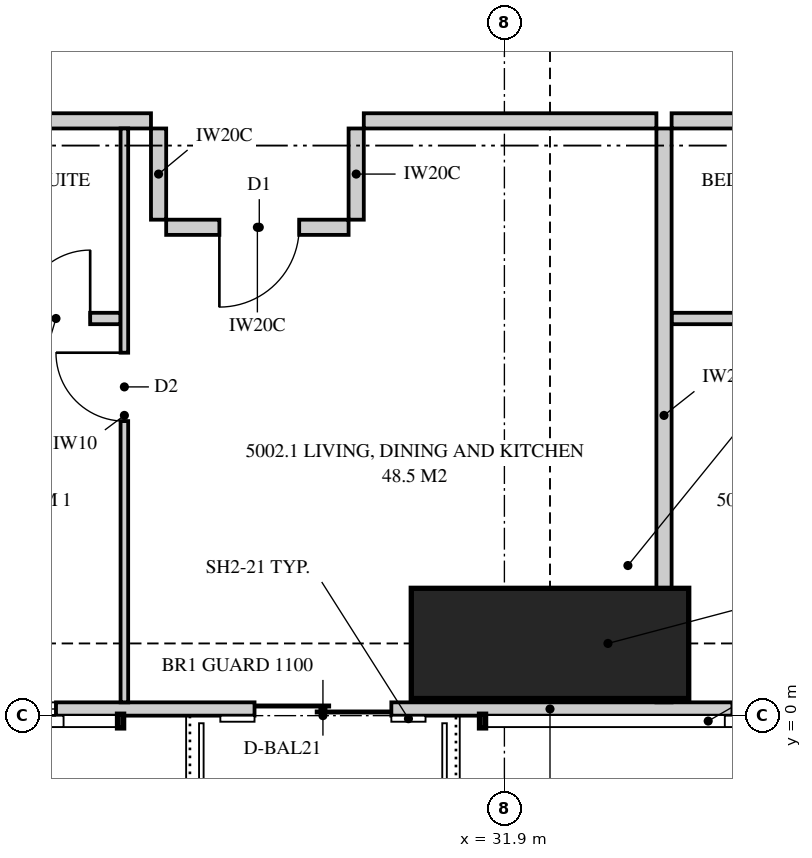
"""IFC4 building model, lengths in metres.
Left out: names, types, materials, properties, quantities, classifications, styles, units other than length and angle.
Written with IfcOpenShell. Run it as: python <this file> out.ifc"""

import sys

from ifc_helpers import new_model, si_unit, direction, frame, frame_2d, origin, origin_2d, place, context, subcontext, project, spatial, polyline, rectangle, outline, extrude, element, fill, save


model = new_model("IFC4")
c1 = context("Model", 3, precision=1e-05, world=origin(), true_north=direction((0.0, 1.0)))
c2 = subcontext(c1, "Body", "Model", "MODEL_VIEW")
j1 = project(units=[si_unit("LENGTHUNIT", "METRE"), si_unit("PLANEANGLEUNIT", "RADIAN")], contexts=[c1])
p1 = place(None, origin())
s1 = spatial("IfcSite", under=j1, at=p1, CompositionType="ELEMENT")
p2 = place(p1, origin())
s2 = spatial("IfcBuilding", under=s1, at=p2, CompositionType="ELEMENT")
p3 = place(p2, frame((0.0, 0.0, 184.5)))
s3 = spatial("IfcBuildingStorey", under=s2, at=p3, CompositionType="ELEMENT", Elevation=184.5)
p4 = place(p3, frame((32.5, 0.95, 0.0), z_axis=(0.0, 0.0, 1.0), x_axis=(0.0, 1.0, 0.0)))
e1 = element("IfcColumn", 1, at=p4, inside=s3, PredefinedType="COLUMN", context=c2, shape_type="SweptSolid", body=[
    extrude(rectangle(XDim=1.45, YDim=3.65, at=origin_2d()), origin(), (0.0, 0.0, 1.0), 3.35),
])
p5 = place(p3, frame((15.051, 0.087, 0.0), z_axis=(0.0, 0.0, 1.0), x_axis=(1.0, 0.0, 0.0)))
e2 = element("IfcWall", 2, at=p5, inside=s3, PredefinedType="SOLIDWALL", context=c2, shape_type="SweptSolid", body=[
    extrude(outline(polyline([(0.0, 0.0), (34.897, 0.0), (34.897, 3.11), (27.91, 3.11), (27.91, 2.15), (27.836, 2.15), (27.836, 3.11), (27.699, 3.11), (27.699, 2.15), (7.199, 2.15), (7.199, 3.11), (7.062, 3.11), (7.062, 2.15), (6.987, 2.15), (6.987, 3.11), (0.0, 3.11), (0.0, 0.0)])), frame((0.0, 0.087, 0.0), z_axis=(0.0, -1.0, 0.0), x_axis=(1.0, 0.0, 0.0)), (0.0, 0.0, 1.0), 0.175),
])
p6 = place(p5, frame((2.84, 0.0, 0.4)))
e3 = element("IfcOpeningElement", 3, at=p6, cuts=e2, PredefinedType="OPENING", context=c2, shape_type="SweptSolid", body=[
    extrude(rectangle(XDim=2.4, YDim=1.7, at=frame_2d((1.2, 0.85))), frame((0.0, 0.097, 0.0), z_axis=(0.0, -1.0, 0.0), x_axis=(1.0, 0.0, 0.0)), (0.0, 0.0, 1.0), 0.195),
])
p7 = place(p5, frame((9.149, 0.0, 0.4)))
e4 = element("IfcOpeningElement", 4, at=p7, cuts=e2, PredefinedType="OPENING", context=c2, shape_type="SweptSolid", body=[
    extrude(rectangle(XDim=1.8, YDim=1.7, at=frame_2d((0.9, 0.85))), frame((0.0, 0.097, 0.0), z_axis=(0.0, -1.0, 0.0), x_axis=(1.0, 0.0, 0.0)), (0.0, 0.0, 1.0), 0.195),
])
p8 = place(p5, frame((13.561, 0.0, 0.0)))
e5 = element("IfcOpeningElement", 5, at=p8, cuts=e2, PredefinedType="OPENING", context=c2, shape_type="SweptSolid", body=[
    extrude(rectangle(XDim=1.8, YDim=2.1, at=frame_2d((0.9, 1.05))), frame((0.0, 0.097, 0.0), z_axis=(0.0, -1.0, 0.0), x_axis=(1.0, 0.0, 0.0)), (0.0, 0.0, 1.0), 0.195),
])
p9 = place(p5, frame((19.849, 0.0, 0.4)))
e6 = element("IfcOpeningElement", 6, at=p9, cuts=e2, PredefinedType="OPENING", context=c2, shape_type="SweptSolid", body=[
    extrude(rectangle(XDim=1.8, YDim=1.7, at=frame_2d((0.9, 0.85))), frame((0.0, 0.097, 0.0), z_axis=(0.0, -1.0, 0.0), x_axis=(1.0, 0.0, 0.0)), (0.0, 0.0, 1.0), 0.195),
])
p10 = place(p5, frame((23.449, 0.0, 0.4)))
e7 = element("IfcOpeningElement", 7, at=p10, cuts=e2, PredefinedType="OPENING", context=c2, shape_type="SweptSolid", body=[
    extrude(rectangle(XDim=1.8, YDim=1.7, at=frame_2d((0.9, 0.85))), frame((0.0, 0.097, 0.0), z_axis=(0.0, -1.0, 0.0), x_axis=(1.0, 0.0, 0.0)), (0.0, 0.0, 1.0), 0.195),
])
p11 = place(p5, frame((29.636, 0.0, 0.4)))
e8 = element("IfcOpeningElement", 8, at=p11, cuts=e2, PredefinedType="OPENING", context=c2, shape_type="SweptSolid", body=[
    extrude(rectangle(XDim=1.8, YDim=1.7, at=frame_2d((0.9, 0.85))), frame((0.0, 0.097, 0.0), z_axis=(0.0, -1.0, 0.0), x_axis=(1.0, 0.0, 0.0)), (0.0, 0.0, 1.0), 0.195),
])
p12 = place(p5, frame((32.56, 0.0, 0.4)))
e9 = element("IfcOpeningElement", 9, at=p12, cuts=e2, PredefinedType="OPENING", context=c2, shape_type="SweptSolid", body=[
    extrude(rectangle(XDim=1.8, YDim=1.7, at=frame_2d((0.9, 0.85))), frame((0.0, 0.097, 0.0), z_axis=(0.0, -1.0, 0.0), x_axis=(1.0, 0.0, 0.0)), (0.0, 0.0, 1.0), 0.195),
])
p13 = place(p3, frame((34.0, 0.175, 0.0), z_axis=(0.0, 0.0, 1.0), x_axis=(0.0, 1.0, 0.0)))
e10 = element("IfcWall", 10, at=p13, inside=s3, PredefinedType="PARTITIONING", context=c2, shape_type="SweptSolid", body=[
    extrude(outline(polyline([(0.0, 0.0), (7.55, 0.0), (7.55, 3.11), (1.685, 3.11), (1.685, 2.15), (0.0, 2.15), (0.0, 3.11), (0.0, 0.0)])), frame((0.0, 0.1, 0.0), z_axis=(0.0, -1.0, 0.0), x_axis=(1.0, 0.0, 0.0)), (0.0, 0.0, 1.0), 0.2),
])
p14 = place(p3, frame((23.4, 7.825, 0.0), z_axis=(0.0, 0.0, 1.0), x_axis=(1.0, 0.0, 0.0)))
e11 = element("IfcWall", 11, at=p14, inside=s3, PredefinedType="PARTITIONING", context=c2, shape_type="SweptSolid", body=[
    extrude(rectangle(XDim=3.85, YDim=0.2, at=frame_2d((1.925, 0.0))), origin(), (0.0, 0.0, 1.0), 3.11),
])
p15 = place(p3, frame((26.9, 0.175, 0.0), z_axis=(0.0, 0.0, 1.0), x_axis=(0.0, 1.0, 0.0)))
e12 = element("IfcWall", 12, at=p15, inside=s3, PredefinedType="PARTITIONING", context=c2, shape_type="SweptSolid", body=[
    extrude(outline(polyline([(0.0, 0.0), (7.55, 0.0), (7.55, 3.11), (1.635, 3.11), (1.635, 2.15), (0.0, 2.15), (0.0, 3.11), (0.0, 0.0)])), frame((0.0, 0.05, 0.0), z_axis=(0.0, -1.0, 0.0), x_axis=(1.0, 0.0, 0.0)), (0.0, 0.0, 1.0), 0.1),
])
p16 = place(p15, frame((3.7, 0.0, 0.0)))
e13 = element("IfcOpeningElement", 13, at=p16, cuts=e12, PredefinedType="OPENING", context=c2, shape_type="SweptSolid", body=[
    extrude(rectangle(XDim=0.9, YDim=2.1, at=frame_2d((0.45, 1.05))), frame((0.0, 0.06, 0.0), z_axis=(0.0, -1.0, 0.0), x_axis=(1.0, 0.0, 0.0)), (0.0, 0.0, 1.0), 0.12),
])
p17 = place(p3, frame((23.4, 5.225, 0.0), z_axis=(0.0, 0.0, 1.0), x_axis=(1.0, 0.0, 0.0)))
e14 = element("IfcWall", 14, at=p17, inside=s3, PredefinedType="PLUMBINGWALL", context=c2, shape_type="SweptSolid", body=[
    extrude(rectangle(XDim=3.45, YDim=0.15, at=frame_2d((1.725, 0.0))), origin(), (0.0, 0.0, 1.0), 3.11),
])
p18 = place(p17, frame((2.15, 0.0, 0.0)))
e15 = element("IfcOpeningElement", 15, at=p18, cuts=e14, PredefinedType="OPENING", context=c2, shape_type="SweptSolid", body=[
    extrude(rectangle(XDim=0.9, YDim=2.1, at=frame_2d((0.45, 1.05))), frame((0.0, 0.085, 0.0), z_axis=(0.0, -1.0, 0.0), x_axis=(1.0, 0.0, 0.0)), (0.0, 0.0, 1.0), 0.17),
])
p19 = place(p3, frame((34.1, 7.825, 0.0), z_axis=(0.0, 0.0, 1.0), x_axis=(1.0, 0.0, 0.0)))
e16 = element("IfcWall", 16, at=p19, inside=s3, PredefinedType="PARTITIONING", context=c2, shape_type="SweptSolid", body=[
    extrude(outline(polyline([(0.0, 0.0), (11.85, 0.0), (11.85, 3.11), (8.987, 3.11), (8.987, 2.541), (8.312, 2.541), (8.312, 3.11), (0.0, 3.11), (0.0, 0.0)])), frame((0.0, 0.1, 0.0), z_axis=(0.0, -1.0, 0.0), x_axis=(1.0, 0.0, 0.0)), (0.0, 0.0, 1.0), 0.2),
])
p20 = place(p19, frame((8.9, 0.0, 0.0)))
e17 = element("IfcOpeningElement", 17, at=p20, cuts=e16, PredefinedType="OPENING", context=c2, shape_type="SweptSolid", body=[
    extrude(rectangle(XDim=1.05, YDim=2.2, at=frame_2d((0.525, 1.1))), frame((0.0, 0.11, 0.0), z_axis=(0.0, -1.0, 0.0), x_axis=(1.0, 0.0, 0.0)), (0.0, 0.0, 1.0), 0.22),
])
p21 = place(p3, frame((34.1, 5.225, 0.0), z_axis=(0.0, 0.0, 1.0), x_axis=(1.0, 0.0, 0.0)))
e18 = element("IfcWall", 18, at=p21, inside=s3, PredefinedType="PLUMBINGWALL", context=c2, shape_type="SweptSolid", body=[
    extrude(rectangle(XDim=3.45, YDim=0.15, at=frame_2d((1.725, 0.0))), origin(), (0.0, 0.0, 1.0), 3.11),
])
p22 = place(p21, frame((2.15, 0.0, 0.0)))
e19 = element("IfcOpeningElement", 19, at=p22, cuts=e18, PredefinedType="OPENING", context=c2, shape_type="SweptSolid", body=[
    extrude(rectangle(XDim=0.9, YDim=2.1, at=frame_2d((0.45, 1.05))), frame((0.0, 0.085, 0.0), z_axis=(0.0, -1.0, 0.0), x_axis=(1.0, 0.0, 0.0)), (0.0, 0.0, 1.0), 0.17),
])
p23 = place(p3, frame((30.05, 7.825, 0.0), z_axis=(0.0, 0.0, 1.0), x_axis=(1.0, 0.0, 0.0)))
e20 = element("IfcWall", 20, at=p23, inside=s3, PredefinedType="PARTITIONING", context=c2, shape_type="SweptSolid", body=[
    extrude(outline(polyline([(0.0, 0.0), (3.85, 0.0), (3.85, 3.11), (2.787, 3.11), (2.787, 2.541), (2.113, 2.541), (2.113, 3.11), (0.0, 3.11), (0.0, 0.0)])), frame((0.0, 0.1, 0.0), z_axis=(0.0, -1.0, 0.0), x_axis=(1.0, 0.0, 0.0)), (0.0, 0.0, 1.0), 0.2),
])
p24 = place(p3, frame((27.45, 6.425, 0.0), z_axis=(0.0, 0.0, 1.0), x_axis=(1.0, 0.0, 0.0)))
e21 = element("IfcWall", 21, at=p24, inside=s3, PredefinedType="PARTITIONING", context=c2, shape_type="SweptSolid", body=[
    extrude(rectangle(XDim=2.4, YDim=0.2, at=frame_2d((1.2, 0.0))), origin(), (0.0, 0.0, 1.0), 3.11),
])
p25 = place(p24, frame((0.7, 0.0, 0.0)))
e22 = element("IfcOpeningElement", 22, at=p25, cuts=e21, PredefinedType="OPENING", context=c2, shape_type="SweptSolid", body=[
    extrude(rectangle(XDim=1.05, YDim=2.2, at=frame_2d((0.525, 1.1))), frame((0.0, 0.11, 0.0), z_axis=(0.0, -1.0, 0.0), x_axis=(1.0, 0.0, 0.0)), (0.0, 0.0, 1.0), 0.22),
])
for number, where, z_axis, x_axis in (
    (23, (27.35, 7.725, 0.0), (0.0, 0.0, 1.0), (0.0, -1.0, 0.0)),
    (24, (29.95, 7.725, 0.0), (0.0, 0.0, 1.0), (0.0, -1.0, 0.0)),
):
    element("IfcWall", number, at=place(p3, frame(where, z_axis=z_axis, x_axis=x_axis)), inside=s3, PredefinedType="PARTITIONING", context=c2, shape_type="SweptSolid", body=[
        extrude(rectangle(XDim=1.2, YDim=0.2, at=frame_2d((0.6, 0.0))), origin(), (0.0, 0.0, 1.0), 3.11),
    ])
p26 = place(p7, origin())
e25 = element("IfcWindow", 25, at=p26, inside=s3, PartitioningType="SINGLE_PANEL", PredefinedType="WINDOW", context=c2, shape_type="SweptSolid", body=[
    extrude(rectangle(XDim=1.8, YDim=1.7, at=frame_2d((0.9, 0.85))), frame((0.0, 0.03, 0.0), z_axis=(0.0, -1.0, 0.0), x_axis=(1.0, 0.0, 0.0)), (0.0, 0.0, 1.0), 0.06),
])
fill(e4, e25)
p27 = place(p8, origin())
e26 = element("IfcDoor", 26, at=p27, inside=s3, OperationType="SLIDING_TO_LEFT", PredefinedType="DOOR", context=c2, shape_type="SweptSolid", body=[
    extrude(rectangle(XDim=1.8, YDim=2.1, at=frame_2d((0.9, 1.05))), frame((0.0, 0.025, 0.0), z_axis=(0.0, -1.0, 0.0), x_axis=(1.0, 0.0, 0.0)), (0.0, 0.0, 1.0), 0.05),
])
fill(e5, e26)
p28 = place(p9, origin())
e27 = element("IfcWindow", 27, at=p28, inside=s3, PartitioningType="SINGLE_PANEL", PredefinedType="WINDOW", context=c2, shape_type="SweptSolid", body=[
    extrude(rectangle(XDim=1.8, YDim=1.7, at=frame_2d((0.9, 0.85))), frame((0.0, 0.03, 0.0), z_axis=(0.0, -1.0, 0.0), x_axis=(1.0, 0.0, 0.0)), (0.0, 0.0, 1.0), 0.06),
])
fill(e6, e27)
p29 = place(p25, frame((1.05, 0.0, 0.0), z_axis=(0.0, 0.0, 1.0), x_axis=(-1.0, 0.0, 0.0)))
e28 = element("IfcDoor", 28, at=p29, inside=s3, OperationType="SINGLE_SWING_RIGHT", PredefinedType="DOOR", context=c2, shape_type="SweptSolid", body=[
    extrude(rectangle(XDim=1.05, YDim=2.2, at=frame_2d((0.525, 1.1))), frame((0.0, 0.025, 0.0), z_axis=(0.0, -1.0, 0.0), x_axis=(1.0, 0.0, 0.0)), (0.0, 0.0, 1.0), 0.05),
])
fill(e22, e28)
p30 = place(p16, origin())
e29 = element("IfcDoor", 29, at=p30, inside=s3, OperationType="SINGLE_SWING_RIGHT", PredefinedType="DOOR", context=c2, shape_type="SweptSolid", body=[
    extrude(rectangle(XDim=0.9, YDim=2.1, at=frame_2d((0.45, 1.05))), frame((0.0, 0.025, 0.0), z_axis=(0.0, -1.0, 0.0), x_axis=(1.0, 0.0, 0.0)), (0.0, 0.0, 1.0), 0.05),
])
fill(e13, e29)
p31 = place(p18, origin())
e30 = element("IfcDoor", 30, at=p31, inside=s3, OperationType="SINGLE_SWING_RIGHT", PredefinedType="DOOR", context=c2, shape_type="SweptSolid", body=[
    extrude(rectangle(XDim=0.9, YDim=2.1, at=frame_2d((0.45, 1.05))), frame((0.0, 0.025, 0.0), z_axis=(0.0, -1.0, 0.0), x_axis=(1.0, 0.0, 0.0)), (0.0, 0.0, 1.0), 0.05),
])
fill(e15, e30)
save(model, sys.argv[1])
